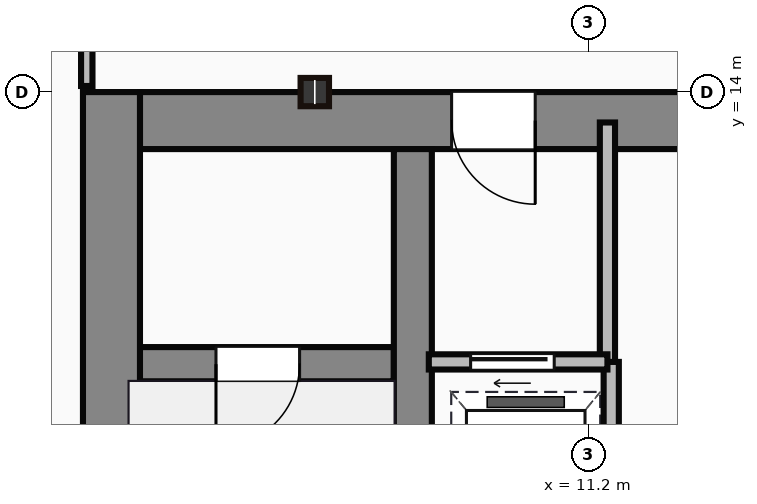
"""IFC4 building model, lengths in metres.
Left out: names, types, materials, properties, quantities, classifications, styles, units other than length and angle.
Written with IfcOpenShell. Run it as: python <this file> out.ifc"""

import sys

from ifc_helpers import new_model, si_unit, direction, frame, frame_2d, origin, origin_2d, place, context, subcontext, project, spatial, rectangle, i_section, extrude, source, transform, mapped, element, fill, save


model = new_model("IFC4")
c1 = context("Model", 3, precision=1e-05, world=origin(), true_north=direction((0.0, 1.0)))
c2 = subcontext(c1, "Body", "Model", "MODEL_VIEW")
j1 = project(units=[si_unit("LENGTHUNIT", "METRE"), si_unit("PLANEANGLEUNIT", "RADIAN")], contexts=[c1])
p1 = place(None, origin())
s1 = spatial("IfcSite", under=j1, at=p1, CompositionType="ELEMENT")
p2 = place(p1, origin())
s2 = spatial("IfcBuilding", under=s1, at=p2, CompositionType="ELEMENT")
p3 = place(p2, frame((0.0, 0.0, 155.2)))
s3 = spatial("IfcBuildingStorey", under=s2, at=p3, CompositionType="ELEMENT", Elevation=155.2)
m1 = source(origin(), c2, "Body", "SweptSolid", [
    extrude(rectangle(XDim=13.1, YDim=0.75, at=frame_2d((6.55, 0.0))), origin(), (0.0, 0.0, 1.0), 3.65),
])
p4 = place(p3, frame((4.925, 0.9, 0.0), z_axis=(0.0, 0.0, 1.0), x_axis=(0.0, 1.0, 0.0)))
e1 = element("IfcWall", 1, at=p4, inside=s3, PredefinedType="SHEAR", context=c2, shape_type="MappedRepresentation", body=[
    mapped(m1, transform((0.0, 0.0, 0.0))),
])
m2 = source(origin(), c2, "Body", "SweptSolid", [
    extrude(rectangle(XDim=9.1, YDim=0.75, at=frame_2d((4.55, 0.0))), origin(), (0.0, 0.0, 1.0), 3.65),
])
p5 = place(p3, frame((5.3, 13.625, 0.0), z_axis=(0.0, 0.0, 1.0), x_axis=(1.0, 0.0, 0.0)))
e2 = element("IfcWall", 2, at=p5, inside=s3, PredefinedType="SHEAR", context=c2, shape_type="MappedRepresentation", body=[
    mapped(m2, transform((0.0, 0.0, 0.0))),
])
p6 = place(p5, frame((4.1, 0.0, 0.0)))
e3 = element("IfcOpeningElement", 3, at=p6, cuts=e2, PredefinedType="OPENING", context=c2, shape_type="SweptSolid", body=[
    extrude(rectangle(XDim=1.1, YDim=2.15, at=frame_2d((0.55, 1.075))), frame((0.0, 0.385, 0.0), z_axis=(0.0, -1.0, 0.0), x_axis=(1.0, 0.0, 0.0)), (0.0, 0.0, 1.0), 0.77),
])
m3 = source(origin(), c2, "Body", "SweptSolid", [
    extrude(rectangle(XDim=12.35, YDim=0.5, at=frame_2d((6.175, 0.0))), origin(), (0.0, 0.0, 1.0), 3.65),
])
p7 = place(p3, frame((8.89, 0.9, 0.0), z_axis=(0.0, 0.0, 1.0), x_axis=(0.0, 1.0, 0.0)))
e4 = element("IfcWall", 4, at=p7, inside=s3, PredefinedType="SHEAR", context=c2, shape_type="MappedRepresentation", body=[
    mapped(m3, transform((0.0, 0.0, 0.0))),
])
m4 = source(origin(), c2, "Body", "SweptSolid", [
    extrude(rectangle(XDim=3.39, YDim=0.45, at=frame_2d((1.695, 0.0))), origin(), (0.0, 0.0, 1.0), 3.65),
])
p8 = place(p3, frame((5.25, 10.42, 0.0), z_axis=(0.0, 0.0, 1.0), x_axis=(1.0, 0.0, 0.0)))
e5 = element("IfcWall", 5, at=p8, inside=s3, PredefinedType="SHEAR", context=c2, shape_type="MappedRepresentation", body=[
    mapped(m4, transform((0.0, 0.0, 0.0))),
])
p9 = place(p8, frame((1.05, 0.0, 0.0)))
e6 = element("IfcOpeningElement", 6, at=p9, cuts=e5, PredefinedType="OPENING", context=c2, shape_type="SweptSolid", body=[
    extrude(rectangle(XDim=1.1, YDim=2.15, at=frame_2d((0.55, 1.075))), frame((0.0, 0.235, 0.0), z_axis=(0.0, -1.0, 0.0), x_axis=(1.0, 0.0, 0.0)), (0.0, 0.0, 1.0), 0.47),
])
m5 = source(origin(), c2, "Body", "SweptSolid", [
    extrude(i_section(OverallWidth=0.374, OverallDepth=0.372, WebThickness=0.016, FlangeThickness=0.026, at=origin_2d()), origin(), (0.0, 0.0, 1.0), 3.65),
])
p10 = place(p3, frame((7.6, 14.0, 0.0), z_axis=(0.0, 0.0, 1.0), x_axis=(1.0, 0.0, 0.0)))
e7 = element("IfcColumn", 7, at=p10, inside=s3, PredefinedType="COLUMN", context=c2, shape_type="MappedRepresentation", body=[
    mapped(m5, transform((0.0, 0.0, 0.0))),
])
m6 = source(origin(), c2, "Body", "SweptSolid", [
    extrude(rectangle(XDim=3.18, YDim=0.2, at=frame_2d((1.59, 0.0))), origin(), (0.0, 0.0, 1.0), 3.4),
])
p11 = place(p3, frame((11.45, 10.42, 0.0), z_axis=(0.0, 0.0, 1.0), x_axis=(0.0, 1.0, 0.0)))
e8 = element("IfcWall", 8, at=p11, inside=s3, PredefinedType="PARTITIONING", context=c2, shape_type="MappedRepresentation", body=[
    mapped(m6, transform((0.0, 0.0, 0.0))),
])
m7 = source(origin(), c2, "Body", "SweptSolid", [
    extrude(rectangle(XDim=2.35, YDim=0.2, at=frame_2d((1.175, 0.0))), origin(), (0.0, 0.0, 1.0), 3.4),
])
p12 = place(p3, frame((9.1, 10.45, 0.0), z_axis=(0.0, 0.0, 1.0), x_axis=(1.0, 0.0, 0.0)))
e9 = element("IfcWall", 9, at=p12, inside=s3, PredefinedType="PARTITIONING", context=c2, shape_type="MappedRepresentation", body=[
    mapped(m7, transform((0.0, 0.0, 0.0))),
])
p13 = place(p12, frame((0.55, 0.0, 0.0)))
e10 = element("IfcOpeningElement", 10, at=p13, cuts=e9, PredefinedType="OPENING", context=c2, shape_type="SweptSolid", body=[
    extrude(rectangle(XDim=1.1, YDim=2.15, at=frame_2d((0.55, 1.075))), frame((0.0, 0.11, 0.0), z_axis=(0.0, -1.0, 0.0), x_axis=(1.0, 0.0, 0.0)), (0.0, 0.0, 1.0), 0.22),
])
m8 = source(origin(), c2, "Body", "SweptSolid", [
    extrude(rectangle(XDim=9.6, YDim=0.2, at=frame_2d((4.8, 0.0))), origin(), (0.0, 0.0, 1.0), 3.4),
])
p14 = place(p3, frame((11.5, 0.85, 0.0), z_axis=(0.0, 0.0, 1.0), x_axis=(0.0, 1.0, 0.0)))
e11 = element("IfcWall", 11, at=p14, inside=s3, PredefinedType="PARTITIONING", context=c2, shape_type="MappedRepresentation", body=[
    mapped(m8, transform((0.0, 0.0, 0.0))),
])
p15 = place(p14, frame((4.2, 0.0, 0.0)))
e12 = element("IfcOpeningElement", 12, at=p15, cuts=e11, PredefinedType="OPENING", context=c2, shape_type="SweptSolid", body=[
    extrude(rectangle(XDim=1.1, YDim=2.15, at=frame_2d((0.55, 1.075))), frame((0.0, 0.11, 0.0), z_axis=(0.0, -1.0, 0.0), x_axis=(1.0, 0.0, 0.0)), (0.0, 0.0, 1.0), 0.22),
])
p16 = place(p14, frame((0.9, 0.0, 0.0)))
e13 = element("IfcOpeningElement", 13, at=p16, cuts=e11, PredefinedType="OPENING", context=c2, shape_type="SweptSolid", body=[
    extrude(rectangle(XDim=1.2, YDim=2.15, at=frame_2d((0.6, 1.075))), frame((0.0, 0.11, 0.0), z_axis=(0.0, -1.0, 0.0), x_axis=(1.0, 0.0, 0.0)), (0.0, 0.0, 1.0), 0.22),
])
m9 = source(origin(), c2, "Body", "SweptSolid", [
    extrude(rectangle(XDim=2.22, YDim=0.15, at=frame_2d((1.11, 0.0))), origin(), (0.0, 0.0, 1.0), 3.4),
])
p17 = place(p3, frame((4.6, 14.08, 0.0), z_axis=(0.0, 0.0, 1.0), x_axis=(0.0, 1.0, 0.0)))
e14 = element("IfcWall", 14, at=p17, inside=s3, PredefinedType="PARTITIONING", context=c2, shape_type="MappedRepresentation", body=[
    mapped(m9, transform((0.0, 0.0, 0.0))),
])
m10 = source(origin(), c2, "Body", "SweptSolid", [
    extrude(rectangle(XDim=1.1, YDim=2.15, at=frame_2d((0.55, 1.075))), frame((0.0, 0.025, 0.0), z_axis=(0.0, -1.0, 0.0), x_axis=(1.0, 0.0, 0.0)), (0.0, 0.0, 1.0), 0.05),
])
p18 = place(p9, frame((1.1, 0.0, 0.0), z_axis=(0.0, 0.0, 1.0), x_axis=(-1.0, 0.0, 0.0)))
e15 = element("IfcDoor", 15, at=p18, inside=s3, OperationType="SINGLE_SWING_LEFT", PredefinedType="DOOR", context=c2, shape_type="MappedRepresentation", body=[
    mapped(m10, transform((0.0, 0.0, 0.0))),
])
fill(e6, e15)
p19 = place(p6, origin())
e16 = element("IfcDoor", 16, at=p19, inside=s3, OperationType="SINGLE_SWING_RIGHT", PredefinedType="DOOR", context=c2, shape_type="MappedRepresentation", body=[
    mapped(m10, transform((0.0, 0.0, 0.0))),
])
fill(e3, e16)
p20 = place(p13, origin())
e17 = element("IfcDoor", 17, at=p20, inside=s3, OperationType="SLIDING_TO_LEFT", PredefinedType="DOOR", context=c2, shape_type="MappedRepresentation", body=[
    mapped(m10, transform((0.0, 0.0, 0.0))),
])
fill(e10, e17)
save(model, sys.argv[1])
